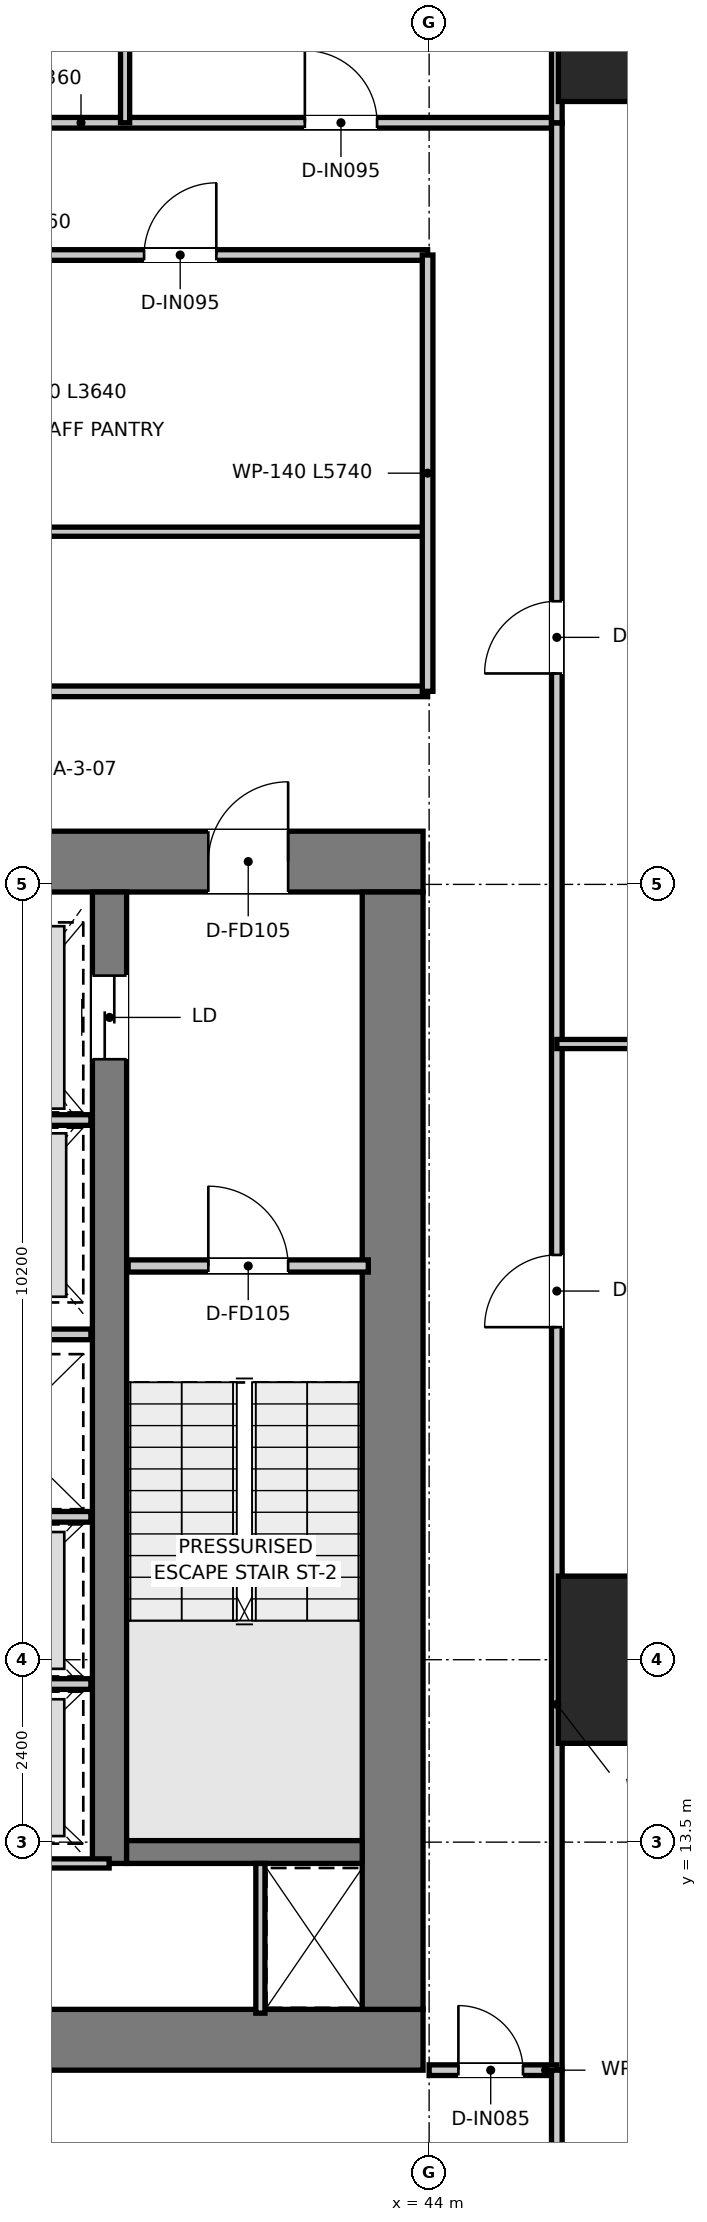
"""IFC4 building model, lengths in metres.
Left out: names, types, materials, properties, quantities, classifications, styles, units other than length and angle.
Written with IfcOpenShell. Run it as: python <this file> out.ifc"""

import sys

from ifc_helpers import new_model, si_unit, direction, frame, frame_2d, origin, origin_2d, place, context, subcontext, project, spatial, rectangle, extrude, source, transform, mapped, element, fill, save


model = new_model("IFC4")
c1 = context("Model", 3, precision=1e-05, world=origin(), true_north=direction((0.0, 1.0)))
c2 = subcontext(c1, "Body", "Model", "MODEL_VIEW")
j1 = project(units=[si_unit("LENGTHUNIT", "METRE"), si_unit("PLANEANGLEUNIT", "RADIAN")], contexts=[c1])
p1 = place(None, origin())
s1 = spatial("IfcSite", under=j1, at=p1, CompositionType="ELEMENT")
p2 = place(p1, origin())
s2 = spatial("IfcBuilding", under=s1, at=p2, CompositionType="ELEMENT")
p3 = place(p2, frame((0.0, 0.0, 32.9)))
s3 = spatial("IfcBuildingStorey", under=s2, at=p3, CompositionType="ELEMENT", Elevation=32.9)
p4 = place(p3, frame((28.08, 10.9, 0.0), z_axis=(0.0, 0.0, 1.0), x_axis=(1.0, 0.0, 0.0)))
e1 = element("IfcWall", 1, at=p4, inside=s3, PredefinedType="SHEAR", context=c2, shape_type="SweptSolid", body=[
    extrude(rectangle(XDim=15.84, YDim=0.8, at=frame_2d((7.92, 0.0))), origin(), (0.0, 0.0, 1.0), 3.95),
])
p5 = place(p3, frame((28.08, 26.4, 0.0), z_axis=(0.0, 0.0, 1.0), x_axis=(1.0, 0.0, 0.0)))
e2 = element("IfcWall", 2, at=p5, inside=s3, PredefinedType="SHEAR", context=c2, shape_type="SweptSolid", body=[
    extrude(rectangle(XDim=15.84, YDim=0.8, at=frame_2d((7.92, 0.0))), origin(), (0.0, 0.0, 1.0), 3.95),
])
p6 = place(p5, frame((7.22, 0.0, 0.0)))
e3 = element("IfcOpeningElement", 3, at=p6, cuts=e2, PredefinedType="OPENING", context=c2, shape_type="SweptSolid", body=[
    extrude(rectangle(XDim=1.4, YDim=2.2, at=frame_2d((0.7, 1.1))), frame((0.0, 0.41, 0.0), z_axis=(0.0, -1.0, 0.0), x_axis=(1.0, 0.0, 0.0)), (0.0, 0.0, 1.0), 0.82),
])
p7 = place(p5, frame((1.775, 0.0, 0.0)))
e4 = element("IfcOpeningElement", 4, at=p7, cuts=e2, PredefinedType="OPENING", context=c2, shape_type="SweptSolid", body=[
    extrude(rectangle(XDim=1.05, YDim=2.1, at=frame_2d((0.525, 1.05))), frame((0.0, 0.41, 0.0), z_axis=(0.0, -1.0, 0.0), x_axis=(1.0, 0.0, 0.0)), (0.0, 0.0, 1.0), 0.82),
])
p8 = place(p5, frame((13.015, 0.0, 0.0)))
e5 = element("IfcOpeningElement", 5, at=p8, cuts=e2, PredefinedType="OPENING", context=c2, shape_type="SweptSolid", body=[
    extrude(rectangle(XDim=1.05, YDim=2.1, at=frame_2d((0.525, 1.05))), frame((0.0, 0.41, 0.0), z_axis=(0.0, -1.0, 0.0), x_axis=(1.0, 0.0, 0.0)), (0.0, 0.0, 1.0), 0.82),
])
p9 = place(p3, frame((43.52, 11.3, 0.0), z_axis=(0.0, 0.0, 1.0), x_axis=(0.0, 1.0, 0.0)))
e6 = element("IfcWall", 6, at=p9, inside=s3, PredefinedType="SHEAR", context=c2, shape_type="SweptSolid", body=[
    extrude(rectangle(XDim=14.7, YDim=0.8, at=frame_2d((7.35, 0.0))), origin(), (0.0, 0.0, 1.0), 3.95),
])
p10 = place(p3, frame((39.795, 13.22, 0.0), z_axis=(0.0, 0.0, 1.0), x_axis=(0.0, 1.0, 0.0)))
e7 = element("IfcWall", 7, at=p10, inside=s3, PredefinedType="SHEAR", context=c2, shape_type="SweptSolid", body=[
    extrude(rectangle(XDim=12.78, YDim=0.45, at=frame_2d((6.39, 0.0))), origin(), (0.0, 0.0, 1.0), 3.95),
])
p11 = place(p10, frame((10.58, 0.0, 0.0)))
e8 = element("IfcOpeningElement", 8, at=p11, cuts=e7, PredefinedType="OPENING", context=c2, shape_type="SweptSolid", body=[
    extrude(rectangle(XDim=1.1, YDim=2.15, at=frame_2d((0.55, 1.075))), frame((0.0, 0.235, 0.0), z_axis=(0.0, -1.0, 0.0), x_axis=(1.0, 0.0, 0.0)), (0.0, 0.0, 1.0), 0.47),
])
p12 = place(p3, frame((40.02, 13.37, 0.0), z_axis=(0.0, 0.0, 1.0), x_axis=(1.0, 0.0, 0.0)))
e9 = element("IfcWall", 9, at=p12, inside=s3, PredefinedType="SHEAR", context=c2, shape_type="SweptSolid", body=[
    extrude(rectangle(XDim=3.1, YDim=0.3, at=frame_2d((1.55, 0.0))), origin(), (0.0, 0.0, 1.0), 3.95),
])
m1 = source(origin(), c2, "Body", "SweptSolid", [
    extrude(rectangle(XDim=2.2, YDim=2.2, at=origin_2d()), origin(), (0.0, 0.0, 1.0), 3.95),
])
for number, where, z_axis, x_axis in (
    (10, (46.8, 15.9, 0.0), (0.0, 0.0, 1.0), (1.0, 0.0, 0.0)),
    (11, (46.8, 37.5, 0.0), (0.0, 0.0, 1.0), (1.0, 0.0, 0.0)),
):
    element("IfcColumn", number, at=place(p3, frame(where, z_axis=z_axis, x_axis=x_axis)), inside=s3, PredefinedType="USERDEFINED", context=c2, shape_type="MappedRepresentation", body=[
        mapped(m1, transform((0.0, 0.0, 0.0), x_axis=(1.0, 0.0, 0.0), y_axis=(0.0, 1.0, 0.0), z_axis=(0.0, 0.0, 1.0), scale=1.0)),
    ])
p13 = place(p3, frame((40.04, 21.08, 0.0), z_axis=(0.0, 0.0, 1.0), x_axis=(1.0, 0.0, 0.0)))
e12 = element("IfcWall", 12, at=p13, inside=s3, PredefinedType="PARTITIONING", context=c2, shape_type="SweptSolid", body=[
    extrude(rectangle(XDim=3.16, YDim=0.16, at=frame_2d((1.58, 0.0))), origin(), (0.0, 0.0, 1.0), 3.67),
])
p14 = place(p13, frame((1.055, 0.0, 0.0)))
e13 = element("IfcOpeningElement", 13, at=p14, cuts=e12, PredefinedType="OPENING", context=c2, shape_type="SweptSolid", body=[
    extrude(rectangle(XDim=1.05, YDim=2.1, at=frame_2d((0.525, 1.05))), frame((0.0, 0.09, 0.0), z_axis=(0.0, -1.0, 0.0), x_axis=(1.0, 0.0, 0.0)), (0.0, 0.0, 1.0), 0.18),
])
p15 = place(p3, frame((37.28, 23.0, 0.0), z_axis=(0.0, 0.0, 1.0), x_axis=(1.0, 0.0, 0.0)))
e14 = element("IfcWall", 14, at=p15, inside=s3, PredefinedType="PARTITIONING", context=c2, shape_type="SweptSolid", body=[
    extrude(rectangle(XDim=2.27, YDim=0.14, at=frame_2d((1.135, 0.0))), origin(), (0.0, 0.0, 1.0), 2.47),
])
for number, where, z_axis, x_axis in (
    (15, (37.28, 17.78, 0.0), (0.0, 0.0, 1.0), (1.0, 0.0, 0.0)),
    (16, (37.28, 20.18, 0.0), (0.0, 0.0, 1.0), (1.0, 0.0, 0.0)),
    (17, (37.28, 15.58, 0.0), (0.0, 0.0, 1.0), (1.0, 0.0, 0.0)),
):
    element("IfcWall", number, at=place(p3, frame(where, z_axis=z_axis, x_axis=x_axis)), inside=s3, PredefinedType="PARTITIONING", context=c2, shape_type="SweptSolid", body=[
        extrude(rectangle(XDim=2.27, YDim=0.14, at=frame_2d((1.135, 0.0))), origin(), (0.0, 0.0, 1.0), 3.67),
    ])
p16 = place(p3, frame((41.78, 11.25, 0.0), z_axis=(0.0, 0.0, 1.0), x_axis=(0.0, 1.0, 0.0)))
e18 = element("IfcWall", 18, at=p16, inside=s3, PredefinedType="PARTITIONING", context=c2, shape_type="SweptSolid", body=[
    extrude(rectangle(XDim=1.97, YDim=0.12, at=frame_2d((0.985, 0.0))), origin(), (0.0, 0.0, 1.0), 3.67),
])
p17 = place(p3, frame((32.21, 13.22, 0.0), z_axis=(0.0, 0.0, 1.0), x_axis=(1.0, 0.0, 0.0)))
e19 = element("IfcWall", 19, at=p17, inside=s3, PredefinedType="PARTITIONING", context=c2, shape_type="SweptSolid", body=[
    extrude(rectangle(XDim=7.58, YDim=0.12, at=frame_2d((3.79, 0.0))), origin(), (0.0, 0.0, 1.0), 3.67),
])
p18 = place(p17, frame((3.365, 0.0, 0.0)))
e20 = element("IfcOpeningElement", 20, at=p18, cuts=e19, PredefinedType="OPENING", context=c2, shape_type="SweptSolid", body=[
    extrude(rectangle(XDim=0.85, YDim=2.1, at=frame_2d((0.425, 1.05))), frame((0.0, 0.07, 0.0), z_axis=(0.0, -1.0, 0.0), x_axis=(1.0, 0.0, 0.0)), (0.0, 0.0, 1.0), 0.14),
])
p19 = place(p3, frame((28.02, 28.64, 0.0), z_axis=(0.0, 0.0, 1.0), x_axis=(1.0, 0.0, 0.0)))
e21 = element("IfcWall", 21, at=p19, inside=s3, PredefinedType="PARTITIONING", context=c2, shape_type="SweptSolid", body=[
    extrude(rectangle(XDim=15.96, YDim=0.14, at=frame_2d((7.98, 0.0))), origin(), (0.0, 0.0, 1.0), 3.08),
])
p20 = place(p19, frame((7.455, 0.0, 0.0)))
e22 = element("IfcOpeningElement", 22, at=p20, cuts=e21, PredefinedType="OPENING", context=c2, shape_type="SweptSolid", body=[
    extrude(rectangle(XDim=1.05, YDim=2.15, at=frame_2d((0.525, 1.075))), frame((0.0, 0.08, 0.0), z_axis=(0.0, -1.0, 0.0), x_axis=(1.0, 0.0, 0.0)), (0.0, 0.0, 1.0), 0.16),
])
p21 = place(p3, frame((28.02, 30.74, 0.0), z_axis=(0.0, 0.0, 1.0), x_axis=(1.0, 0.0, 0.0)))
e23 = element("IfcWall", 23, at=p21, inside=s3, PredefinedType="PARTITIONING", context=c2, shape_type="SweptSolid", body=[
    extrude(rectangle(XDim=15.96, YDim=0.12, at=frame_2d((7.98, 0.0))), origin(), (0.0, 0.0, 1.0), 3.08),
])
p22 = place(p3, frame((28.02, 34.38, 0.0), z_axis=(0.0, 0.0, 1.0), x_axis=(1.0, 0.0, 0.0)))
e24 = element("IfcWall", 24, at=p22, inside=s3, PredefinedType="PARTITIONING", context=c2, shape_type="SweptSolid", body=[
    extrude(rectangle(XDim=15.96, YDim=0.14, at=frame_2d((7.98, 0.0))), origin(), (0.0, 0.0, 1.0), 3.08),
])
p23 = place(p22, frame((1.13, 0.0, 0.0)))
e25 = element("IfcOpeningElement", 25, at=p23, cuts=e24, PredefinedType="OPENING", context=c2, shape_type="SweptSolid", body=[
    extrude(rectangle(XDim=0.9, YDim=2.1, at=frame_2d((0.45, 1.05))), frame((0.0, 0.08, 0.0), z_axis=(0.0, -1.0, 0.0), x_axis=(1.0, 0.0, 0.0)), (0.0, 0.0, 1.0), 0.16),
])
p24 = place(p22, frame((4.33, 0.0, 0.0)))
e26 = element("IfcOpeningElement", 26, at=p24, cuts=e24, PredefinedType="OPENING", context=c2, shape_type="SweptSolid", body=[
    extrude(rectangle(XDim=0.9, YDim=2.1, at=frame_2d((0.45, 1.05))), frame((0.0, 0.08, 0.0), z_axis=(0.0, -1.0, 0.0), x_axis=(1.0, 0.0, 0.0)), (0.0, 0.0, 1.0), 0.16),
])
p25 = place(p22, frame((7.355, 0.0, 0.0)))
e27 = element("IfcOpeningElement", 27, at=p25, cuts=e24, PredefinedType="OPENING", context=c2, shape_type="SweptSolid", body=[
    extrude(rectangle(XDim=0.95, YDim=2.1, at=frame_2d((0.475, 1.05))), frame((0.0, 0.08, 0.0), z_axis=(0.0, -1.0, 0.0), x_axis=(1.0, 0.0, 0.0)), (0.0, 0.0, 1.0), 0.16),
])
p26 = place(p22, frame((12.23, 0.0, 0.0)))
e28 = element("IfcOpeningElement", 28, at=p26, cuts=e24, PredefinedType="OPENING", context=c2, shape_type="SweptSolid", body=[
    extrude(rectangle(XDim=0.95, YDim=2.1, at=frame_2d((0.475, 1.05))), frame((0.0, 0.08, 0.0), z_axis=(0.0, -1.0, 0.0), x_axis=(1.0, 0.0, 0.0)), (0.0, 0.0, 1.0), 0.16),
])
p27 = place(p3, frame((43.98, 28.64, 0.0), z_axis=(0.0, 0.0, 1.0), x_axis=(0.0, 1.0, 0.0)))
e29 = element("IfcWall", 29, at=p27, inside=s3, PredefinedType="PARTITIONING", context=c2, shape_type="SweptSolid", body=[
    extrude(rectangle(XDim=5.74, YDim=0.14, at=frame_2d((2.87, 0.0))), origin(), (0.0, 0.0, 1.0), 3.22),
])
p28 = place(p3, frame((26.32, 36.12, 0.0), z_axis=(0.0, 0.0, 1.0), x_axis=(1.0, 0.0, 0.0)))
e30 = element("IfcWall", 30, at=p28, inside=s3, PredefinedType="PARTITIONING", context=c2, shape_type="SweptSolid", body=[
    extrude(rectangle(XDim=19.36, YDim=0.14, at=frame_2d((9.68, 0.0))), origin(), (0.0, 0.0, 1.0), 3.08),
])
p29 = place(p28, frame((2.365, 0.0, 0.0)))
e31 = element("IfcOpeningElement", 31, at=p29, cuts=e30, PredefinedType="OPENING", context=c2, shape_type="SweptSolid", body=[
    extrude(rectangle(XDim=0.95, YDim=2.1, at=frame_2d((0.475, 1.05))), frame((0.0, 0.08, 0.0), z_axis=(0.0, -1.0, 0.0), x_axis=(1.0, 0.0, 0.0)), (0.0, 0.0, 1.0), 0.16),
])
p30 = place(p28, frame((9.205, 0.0, 0.0)))
e32 = element("IfcOpeningElement", 32, at=p30, cuts=e30, PredefinedType="OPENING", context=c2, shape_type="SweptSolid", body=[
    extrude(rectangle(XDim=0.95, YDim=2.1, at=frame_2d((0.475, 1.05))), frame((0.0, 0.08, 0.0), z_axis=(0.0, -1.0, 0.0), x_axis=(1.0, 0.0, 0.0)), (0.0, 0.0, 1.0), 0.16),
])
p31 = place(p28, frame((16.045, 0.0, 0.0)))
e33 = element("IfcOpeningElement", 33, at=p31, cuts=e30, PredefinedType="OPENING", context=c2, shape_type="SweptSolid", body=[
    extrude(rectangle(XDim=0.95, YDim=2.1, at=frame_2d((0.475, 1.05))), frame((0.0, 0.08, 0.0), z_axis=(0.0, -1.0, 0.0), x_axis=(1.0, 0.0, 0.0)), (0.0, 0.0, 1.0), 0.16),
])
p32 = place(p3, frame((45.68, 10.5, 0.0), z_axis=(0.0, 0.0, 1.0), x_axis=(0.0, 1.0, 0.0)))
e34 = element("IfcWall", 34, at=p32, inside=s3, PredefinedType="PARTITIONING", context=c2, shape_type="SweptSolid", body=[
    extrude(rectangle(XDim=25.62, YDim=0.14, at=frame_2d((12.81, 0.0))), origin(), (0.0, 0.0, 1.0), 2.97),
])
p33 = place(p32, frame((9.775, 0.0, 0.0)))
e35 = element("IfcOpeningElement", 35, at=p33, cuts=e34, PredefinedType="OPENING", context=c2, shape_type="SweptSolid", body=[
    extrude(rectangle(XDim=0.95, YDim=2.1, at=frame_2d((0.475, 1.05))), frame((0.0, 0.08, 0.0), z_axis=(0.0, -1.0, 0.0), x_axis=(1.0, 0.0, 0.0)), (0.0, 0.0, 1.0), 0.16),
])
p34 = place(p32, frame((18.375, 0.0, 0.0)))
e36 = element("IfcOpeningElement", 36, at=p34, cuts=e34, PredefinedType="OPENING", context=c2, shape_type="SweptSolid", body=[
    extrude(rectangle(XDim=0.95, YDim=2.1, at=frame_2d((0.475, 1.05))), frame((0.0, 0.08, 0.0), z_axis=(0.0, -1.0, 0.0), x_axis=(1.0, 0.0, 0.0)), (0.0, 0.0, 1.0), 0.16),
])
p35 = place(p3, frame((44.0, 10.5, 0.0), z_axis=(0.0, 0.0, 1.0), x_axis=(1.0, 0.0, 0.0)))
e37 = element("IfcWall", 37, at=p35, inside=s3, PredefinedType="PARTITIONING", context=c2, shape_type="SweptSolid", body=[
    extrude(rectangle(XDim=1.68, YDim=0.14, at=frame_2d((0.84, 0.0))), origin(), (0.0, 0.0, 1.0), 3.67),
])
p36 = place(p35, frame((0.385, 0.0, 0.0)))
e38 = element("IfcOpeningElement", 38, at=p36, cuts=e37, PredefinedType="OPENING", context=c2, shape_type="SweptSolid", body=[
    extrude(rectangle(XDim=0.85, YDim=2.1, at=frame_2d((0.425, 1.05))), frame((0.0, 0.08, 0.0), z_axis=(0.0, -1.0, 0.0), x_axis=(1.0, 0.0, 0.0)), (0.0, 0.0, 1.0), 0.16),
])
p37 = place(p3, frame((45.68, 36.12, 0.0), z_axis=(0.0, 0.0, 1.0), x_axis=(0.0, 1.0, 0.0)))
e39 = element("IfcWall", 39, at=p37, inside=s3, PredefinedType="PARTITIONING", context=c2, shape_type="SweptSolid", body=[
    extrude(rectangle(XDim=15.49, YDim=0.14, at=frame_2d((7.745, 0.0))), origin(), (0.0, 0.0, 1.0), 2.97),
])
p38 = place(p3, frame((45.68, 1.79, 0.0), z_axis=(0.0, 0.0, 1.0), x_axis=(0.0, 1.0, 0.0)))
e40 = element("IfcWall", 40, at=p38, inside=s3, PredefinedType="PARTITIONING", context=c2, shape_type="SweptSolid", body=[
    extrude(rectangle(XDim=8.71, YDim=0.14, at=frame_2d((4.355, 0.0))), origin(), (0.0, 0.0, 1.0), 3.67),
])
p39 = place(p3, frame((40.0, 36.12, 0.0), z_axis=(0.0, 0.0, 1.0), x_axis=(0.0, 1.0, 0.0)))
e41 = element("IfcWall", 41, at=p39, inside=s3, PredefinedType="PARTITIONING", context=c2, shape_type="SweptSolid", body=[
    extrude(rectangle(XDim=15.49, YDim=0.12, at=frame_2d((7.745, 0.0))), origin(), (0.0, 0.0, 1.0), 2.97),
])
p40 = place(p3, frame((45.68, 24.0, 0.0), z_axis=(0.0, 0.0, 1.0), x_axis=(1.0, 0.0, 0.0)))
e42 = element("IfcWall", 42, at=p40, inside=s3, PredefinedType="PARTITIONING", context=c2, shape_type="SweptSolid", body=[
    extrude(rectangle(XDim=15.23, YDim=0.12, at=frame_2d((7.615, 0.0))), origin(), (0.0, 0.0, 1.0), 2.97),
])
p41 = place(p14, origin())
e43 = element("IfcDoor", 43, at=p41, inside=s3, OperationType="SINGLE_SWING_LEFT", PredefinedType="DOOR", context=c2, shape_type="SweptSolid", body=[
    extrude(rectangle(XDim=1.05, YDim=2.1, at=frame_2d((0.525, 1.05))), frame((0.0, 0.025, 0.0), z_axis=(0.0, -1.0, 0.0), x_axis=(1.0, 0.0, 0.0)), (0.0, 0.0, 1.0), 0.05),
])
fill(e13, e43)
p42 = place(p8, origin())
e44 = element("IfcDoor", 44, at=p42, inside=s3, OperationType="SINGLE_SWING_RIGHT", PredefinedType="DOOR", context=c2, shape_type="SweptSolid", body=[
    extrude(rectangle(XDim=1.05, YDim=2.1, at=frame_2d((0.525, 1.05))), frame((0.0, 0.025, 0.0), z_axis=(0.0, -1.0, 0.0), x_axis=(1.0, 0.0, 0.0)), (0.0, 0.0, 1.0), 0.05),
])
fill(e5, e44)
p43 = place(p11, origin())
e45 = element("IfcDoor", 45, at=p43, inside=s3, OperationType="DOUBLE_DOOR_SLIDING", PredefinedType="DOOR", context=c2, shape_type="SweptSolid", body=[
    extrude(rectangle(XDim=1.1, YDim=2.15, at=frame_2d((0.55, 1.075))), frame((0.0, 0.025, 0.0), z_axis=(0.0, -1.0, 0.0), x_axis=(1.0, 0.0, 0.0)), (0.0, 0.0, 1.0), 0.05),
])
fill(e8, e45)
p44 = place(p26, origin())
e46 = element("IfcDoor", 46, at=p44, inside=s3, OperationType="SINGLE_SWING_RIGHT", PredefinedType="DOOR", context=c2, shape_type="SweptSolid", body=[
    extrude(rectangle(XDim=0.95, YDim=2.1, at=frame_2d((0.475, 1.05))), frame((0.0, 0.025, 0.0), z_axis=(0.0, -1.0, 0.0), x_axis=(1.0, 0.0, 0.0)), (0.0, 0.0, 1.0), 0.05),
])
fill(e28, e46)
p45 = place(p31, origin())
e47 = element("IfcDoor", 47, at=p45, inside=s3, OperationType="SINGLE_SWING_LEFT", PredefinedType="DOOR", context=c2, shape_type="SweptSolid", body=[
    extrude(rectangle(XDim=0.95, YDim=2.1, at=frame_2d((0.475, 1.05))), frame((0.0, 0.025, 0.0), z_axis=(0.0, -1.0, 0.0), x_axis=(1.0, 0.0, 0.0)), (0.0, 0.0, 1.0), 0.05),
])
fill(e33, e47)
p46 = place(p33, origin())
e48 = element("IfcDoor", 48, at=p46, inside=s3, OperationType="SINGLE_SWING_LEFT", PredefinedType="DOOR", context=c2, shape_type="SweptSolid", body=[
    extrude(rectangle(XDim=0.95, YDim=2.1, at=frame_2d((0.475, 1.05))), frame((0.0, 0.025, 0.0), z_axis=(0.0, -1.0, 0.0), x_axis=(1.0, 0.0, 0.0)), (0.0, 0.0, 1.0), 0.05),
])
fill(e35, e48)
p47 = place(p34, origin())
e49 = element("IfcDoor", 49, at=p47, inside=s3, OperationType="SINGLE_SWING_LEFT", PredefinedType="DOOR", context=c2, shape_type="SweptSolid", body=[
    extrude(rectangle(XDim=0.95, YDim=2.1, at=frame_2d((0.475, 1.05))), frame((0.0, 0.025, 0.0), z_axis=(0.0, -1.0, 0.0), x_axis=(1.0, 0.0, 0.0)), (0.0, 0.0, 1.0), 0.05),
])
fill(e36, e49)
p48 = place(p36, origin())
e50 = element("IfcDoor", 50, at=p48, inside=s3, OperationType="SINGLE_SWING_LEFT", PredefinedType="DOOR", context=c2, shape_type="SweptSolid", body=[
    extrude(rectangle(XDim=0.85, YDim=2.1, at=frame_2d((0.425, 1.05))), frame((0.0, 0.025, 0.0), z_axis=(0.0, -1.0, 0.0), x_axis=(1.0, 0.0, 0.0)), (0.0, 0.0, 1.0), 0.05),
])
fill(e38, e50)
save(model, sys.argv[1])
